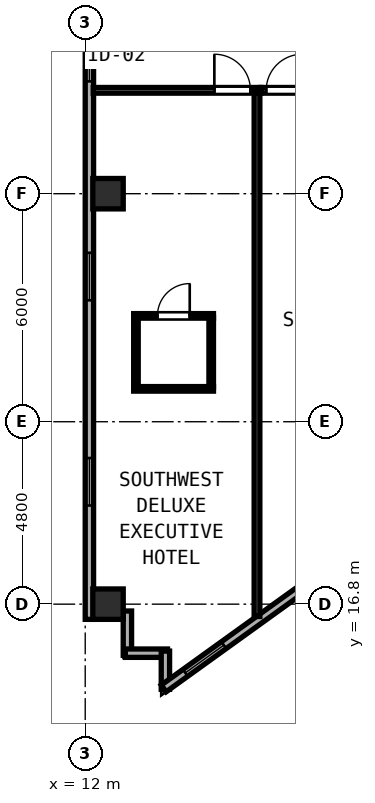
"""IFC4 building model, lengths in metres.
Left out: names, types, materials, properties, quantities, classifications, styles, units other than length and angle.
Written with IfcOpenShell. Run it as: python <this file> out.ifc"""

import sys

from ifc_helpers import new_model, si_unit, direction, frame, frame_2d, origin, origin_2d, place, context, subcontext, project, spatial, rectangle, hollow_rectangle, extrude, element, fill, save


model = new_model("IFC4")
c1 = context("Model", 3, precision=1e-05, world=origin(), true_north=direction((0.0, 1.0)))
c2 = subcontext(c1, "Body", "Model", "MODEL_VIEW")
j1 = project(units=[si_unit("LENGTHUNIT", "METRE"), si_unit("PLANEANGLEUNIT", "RADIAN")], contexts=[c1])
p1 = place(None, origin())
s1 = spatial("IfcSite", under=j1, at=p1, CompositionType="ELEMENT")
p2 = place(p1, origin())
s2 = spatial("IfcBuilding", under=s1, at=p2, CompositionType="ELEMENT")
p3 = place(p2, frame((0.0, 0.0, 262.15)))
s3 = spatial("IfcBuildingStorey", under=s2, at=p3, CompositionType="ELEMENT", Elevation=262.15)
for number, where, z_axis, x_axis in (
    (1, (12.6, 16.8, 0.0), (0.0, 0.0, 1.0), (1.0, 0.0, 0.0)),
    (2, (12.6, 27.6, 0.0), (0.0, 0.0, 1.0), (1.0, 0.0, 0.0)),
):
    element("IfcColumn", number, at=place(p3, frame(where, z_axis=z_axis, x_axis=x_axis)), inside=s3, PredefinedType="COLUMN", context=c2, shape_type="SweptSolid", body=[
        extrude(hollow_rectangle(XDim=0.8, YDim=0.8, WallThickness=0.03, at=origin_2d()), origin(), (0.0, 0.0, 1.0), 3.85),
    ])
p4 = place(p3, frame((12.11, 37.545, 0.0), z_axis=(0.0, 0.0, 1.0), x_axis=(0.0, -1.0, 0.0)))
e3 = element("IfcWall", 3, at=p4, inside=s3, PredefinedType="SOLIDWALL", context=c2, shape_type="SweptSolid", body=[
    extrude(rectangle(XDim=21.145, YDim=0.22, at=frame_2d((10.573, 0.0))), origin(), (0.0, 0.0, 1.0), 3.67),
])
p5 = place(p4, frame((0.7, 0.0, 0.85)))
e4 = element("IfcOpeningElement", 4, at=p5, cuts=e3, PredefinedType="OPENING", context=c2, shape_type="SweptSolid", body=[
    extrude(rectangle(XDim=1.25, YDim=1.95, at=frame_2d((0.625, 0.975))), frame((0.0, 0.12, 0.0), z_axis=(0.0, -1.0, 0.0), x_axis=(1.0, 0.0, 0.0)), (0.0, 0.0, 1.0), 0.24),
])
p6 = place(p4, frame((5.74, 0.0, 0.85)))
e5 = element("IfcOpeningElement", 5, at=p6, cuts=e3, PredefinedType="OPENING", context=c2, shape_type="SweptSolid", body=[
    extrude(rectangle(XDim=1.25, YDim=1.95, at=frame_2d((0.625, 0.975))), frame((0.0, 0.12, 0.0), z_axis=(0.0, -1.0, 0.0), x_axis=(1.0, 0.0, 0.0)), (0.0, 0.0, 1.0), 0.24),
])
p7 = place(p4, frame((11.5, 0.0, 0.85)))
e6 = element("IfcOpeningElement", 6, at=p7, cuts=e3, PredefinedType="OPENING", context=c2, shape_type="SweptSolid", body=[
    extrude(rectangle(XDim=1.25, YDim=1.95, at=frame_2d((0.625, 0.975))), frame((0.0, 0.12, 0.0), z_axis=(0.0, -1.0, 0.0), x_axis=(1.0, 0.0, 0.0)), (0.0, 0.0, 1.0), 0.24),
])
p8 = place(p4, frame((16.9, 0.0, 0.85)))
e7 = element("IfcOpeningElement", 7, at=p8, cuts=e3, PredefinedType="OPENING", context=c2, shape_type="SweptSolid", body=[
    extrude(rectangle(XDim=1.25, YDim=1.95, at=frame_2d((0.625, 0.975))), frame((0.0, 0.12, 0.0), z_axis=(0.0, -1.0, 0.0), x_axis=(1.0, 0.0, 0.0)), (0.0, 0.0, 1.0), 0.24),
])
p9 = place(p3, frame((13.11, 16.62, 0.0), z_axis=(0.0, 0.0, 1.0), x_axis=(0.0, -1.0, 0.0)))
e8 = element("IfcWall", 8, at=p9, inside=s3, PredefinedType="SOLIDWALL", context=c2, shape_type="SweptSolid", body=[
    extrude(rectangle(XDim=1.165, YDim=0.22, at=frame_2d((0.583, 0.0))), origin(), (0.0, 0.0, 1.0), 3.67),
])
p10 = place(p3, frame((13.055, 15.51, 0.0), z_axis=(0.0, 0.0, 1.0), x_axis=(1.0, 0.0, 0.0)))
e9 = element("IfcWall", 9, at=p10, inside=s3, PredefinedType="SOLIDWALL", context=c2, shape_type="SweptSolid", body=[
    extrude(rectangle(XDim=1.11, YDim=0.22, at=frame_2d((0.555, 0.0))), origin(), (0.0, 0.0, 1.0), 3.67),
])
p11 = place(p3, frame((14.11, 15.565, 0.0), z_axis=(0.0, 0.0, 1.0), x_axis=(0.0, -1.0, 0.0)))
e10 = element("IfcWall", 10, at=p11, inside=s3, PredefinedType="SOLIDWALL", context=c2, shape_type="SweptSolid", body=[
    extrude(rectangle(XDim=1.005, YDim=0.22, at=frame_2d((0.502, 0.0))), origin(), (0.0, 0.0, 1.0), 3.67),
])
p12 = place(p3, frame((14.065, 14.583, 0.0), z_axis=(0.0, 0.0, 1.0), x_axis=(0.811523708458, 0.584319493608, 0.0)))
e11 = element("IfcWall", 11, at=p12, inside=s3, PredefinedType="SOLIDWALL", context=c2, shape_type="SweptSolid", body=[
    extrude(rectangle(XDim=11.759, YDim=0.22, at=frame_2d((5.879, 0.0))), origin(), (0.0, 0.0, 1.0), 3.315),
])
p13 = place(p12, frame((0.7, 0.0, 0.85)))
e12 = element("IfcOpeningElement", 12, at=p13, cuts=e11, PredefinedType="OPENING", context=c2, shape_type="SweptSolid", body=[
    extrude(rectangle(XDim=1.25, YDim=1.95, at=frame_2d((0.625, 0.975))), frame((0.0, 0.12, 0.0), z_axis=(0.0, -1.0, 0.0), x_axis=(1.0, 0.0, 0.0)), (0.0, 0.0, 1.0), 0.24),
])
p14 = place(p12, frame((6.1, 0.0, 0.85)))
e13 = element("IfcOpeningElement", 13, at=p14, cuts=e11, PredefinedType="OPENING", context=c2, shape_type="SweptSolid", body=[
    extrude(rectangle(XDim=1.25, YDim=1.95, at=frame_2d((0.625, 0.975))), frame((0.0, 0.12, 0.0), z_axis=(0.0, -1.0, 0.0), x_axis=(1.0, 0.0, 0.0)), (0.0, 0.0, 1.0), 0.24),
])
p15 = place(p12, frame((9.336, 0.0, 0.85)))
e14 = element("IfcOpeningElement", 14, at=p15, cuts=e11, PredefinedType="OPENING", context=c2, shape_type="SweptSolid", body=[
    extrude(rectangle(XDim=1.25, YDim=1.95, at=frame_2d((0.625, 0.975))), frame((0.0, 0.12, 0.0), z_axis=(0.0, -1.0, 0.0), x_axis=(1.0, 0.0, 0.0)), (0.0, 0.0, 1.0), 0.24),
])
p16 = place(p3, frame((12.212, 30.32, 0.0), z_axis=(0.0, 0.0, 1.0), x_axis=(1.0, 0.0, 0.0)))
e15 = element("IfcWall", 15, at=p16, inside=s3, PredefinedType="PARTITIONING", context=c2, shape_type="SweptSolid", body=[
    extrude(rectangle(XDim=4.408, YDim=0.15, at=frame_2d((2.204, 0.0))), origin(), (0.0, 0.0, 1.0), 3.67),
])
p17 = place(p16, frame((4.136, 0.0, 0.0), z_axis=(0.0, 0.0, 1.0), x_axis=(-1.0, 0.0, 0.0)))
e16 = element("IfcOpeningElement", 16, at=p17, cuts=e15, PredefinedType="OPENING", context=c2, shape_type="SweptSolid", body=[
    extrude(rectangle(XDim=0.95, YDim=2.18, at=frame_2d((0.475, 1.09))), frame((0.0, 0.085, 0.0), z_axis=(0.0, -1.0, 0.0), x_axis=(1.0, 0.0, 0.0)), (0.0, 0.0, 1.0), 0.17),
])
p18 = place(p3, frame((16.52, 16.476, 0.0), z_axis=(0.0, 0.0, 1.0), x_axis=(0.0, 1.0, 0.0)))
e17 = element("IfcWall", 17, at=p18, inside=s3, PredefinedType="PARTITIONING", context=c2, shape_type="SweptSolid", body=[
    extrude(rectangle(XDim=13.784, YDim=0.15, at=frame_2d((6.892, 0.0))), origin(), (0.0, 0.0, 1.0), 3.67),
])
p19 = place(p3, frame((13.275, 24.385, 0.0), z_axis=(0.0, 0.0, 1.0), x_axis=(1.0, 0.0, 0.0)))
e18 = element("IfcWall", 18, at=p19, inside=s3, PredefinedType="PARTITIONING", context=c2, shape_type="SweptSolid", body=[
    extrude(rectangle(XDim=2.1, YDim=0.12, at=frame_2d((1.05, 0.0))), origin(), (0.0, 0.0, 1.0), 3.67),
])
p20 = place(p19, frame((1.475, 0.0, 0.0), z_axis=(0.0, 0.0, 1.0), x_axis=(-1.0, 0.0, 0.0)))
e19 = element("IfcOpeningElement", 19, at=p20, cuts=e18, PredefinedType="OPENING", context=c2, shape_type="SweptSolid", body=[
    extrude(rectangle(XDim=0.85, YDim=2.1, at=frame_2d((0.425, 1.05))), frame((0.0, 0.07, 0.0), z_axis=(0.0, -1.0, 0.0), x_axis=(1.0, 0.0, 0.0)), (0.0, 0.0, 1.0), 0.14),
])
p21 = place(p3, frame((13.275, 22.465, 0.0), z_axis=(0.0, 0.0, 1.0), x_axis=(1.0, 0.0, 0.0)))
e20 = element("IfcWall", 20, at=p21, inside=s3, PredefinedType="PARTITIONING", context=c2, shape_type="SweptSolid", body=[
    extrude(rectangle(XDim=2.1, YDim=0.12, at=frame_2d((1.05, 0.0))), origin(), (0.0, 0.0, 1.0), 3.67),
])
for number, where, z_axis, x_axis in (
    (21, (13.335, 22.51, 0.0), (0.0, 0.0, 1.0), (0.0, 1.0, 0.0)),
    (22, (15.315, 22.51, 0.0), (0.0, 0.0, 1.0), (0.0, 1.0, 0.0)),
):
    element("IfcWall", number, at=place(p3, frame(where, z_axis=z_axis, x_axis=x_axis)), inside=s3, PredefinedType="PARTITIONING", context=c2, shape_type="SweptSolid", body=[
        extrude(rectangle(XDim=1.83, YDim=0.12, at=frame_2d((0.915, 0.0))), origin(), (0.0, 0.0, 1.0), 3.67),
    ])
p22 = place(p3, frame((16.622, 30.32, 0.0), z_axis=(0.0, 0.0, 1.0), x_axis=(1.0, 0.0, 0.0)))
e23 = element("IfcWall", 23, at=p22, inside=s3, PredefinedType="PARTITIONING", context=c2, shape_type="SweptSolid", body=[
    extrude(rectangle(XDim=4.098, YDim=0.15, at=frame_2d((2.049, 0.0))), origin(), (0.0, 0.0, 1.0), 3.67),
])
p23 = place(p22, frame((1.09, 0.0, 0.0), z_axis=(0.0, 0.0, 1.0), x_axis=(-1.0, 0.0, 0.0)))
e24 = element("IfcOpeningElement", 24, at=p23, cuts=e23, PredefinedType="OPENING", context=c2, shape_type="SweptSolid", body=[
    extrude(rectangle(XDim=0.95, YDim=2.15, at=frame_2d((0.475, 1.075))), frame((0.0, 0.085, 0.0), z_axis=(0.0, -1.0, 0.0), x_axis=(1.0, 0.0, 0.0)), (0.0, 0.0, 1.0), 0.17),
])
p24 = place(p6, origin())
e25 = element("IfcWindow", 25, at=p24, inside=s3, PartitioningType="SINGLE_PANEL", PredefinedType="WINDOW", context=c2, shape_type="SweptSolid", body=[
    extrude(rectangle(XDim=1.25, YDim=1.95, at=frame_2d((0.625, 0.975))), frame((0.0, 0.03, 0.0), z_axis=(0.0, -1.0, 0.0), x_axis=(1.0, 0.0, 0.0)), (0.0, 0.0, 1.0), 0.06),
])
fill(e5, e25)
p25 = place(p7, origin())
e26 = element("IfcWindow", 26, at=p25, inside=s3, PartitioningType="SINGLE_PANEL", PredefinedType="WINDOW", context=c2, shape_type="SweptSolid", body=[
    extrude(rectangle(XDim=1.25, YDim=1.95, at=frame_2d((0.625, 0.975))), frame((0.0, 0.03, 0.0), z_axis=(0.0, -1.0, 0.0), x_axis=(1.0, 0.0, 0.0)), (0.0, 0.0, 1.0), 0.06),
])
fill(e6, e26)
p26 = place(p8, origin())
e27 = element("IfcWindow", 27, at=p26, inside=s3, PartitioningType="SINGLE_PANEL", PredefinedType="WINDOW", context=c2, shape_type="SweptSolid", body=[
    extrude(rectangle(XDim=1.25, YDim=1.95, at=frame_2d((0.625, 0.975))), frame((0.0, 0.03, 0.0), z_axis=(0.0, -1.0, 0.0), x_axis=(1.0, 0.0, 0.0)), (0.0, 0.0, 1.0), 0.06),
])
fill(e7, e27)
p27 = place(p13, origin())
e28 = element("IfcWindow", 28, at=p27, inside=s3, PartitioningType="SINGLE_PANEL", PredefinedType="WINDOW", context=c2, shape_type="SweptSolid", body=[
    extrude(rectangle(XDim=1.25, YDim=1.95, at=frame_2d((0.625, 0.975))), frame((0.0, 0.03, 0.0), z_axis=(0.0, -1.0, 0.0), x_axis=(1.0, 0.0, 0.0)), (0.0, 0.0, 1.0), 0.06),
])
fill(e12, e28)
p28 = place(p17, origin())
e29 = element("IfcDoor", 29, at=p28, inside=s3, OperationType="SINGLE_SWING_RIGHT", PredefinedType="DOOR", context=c2, shape_type="SweptSolid", body=[
    extrude(rectangle(XDim=0.95, YDim=2.18, at=frame_2d((0.475, 1.09))), frame((0.0, 0.025, 0.0), z_axis=(0.0, -1.0, 0.0), x_axis=(1.0, 0.0, 0.0)), (0.0, 0.0, 1.0), 0.05),
])
fill(e16, e29)
p29 = place(p20, origin())
e30 = element("IfcDoor", 30, at=p29, inside=s3, OperationType="SINGLE_SWING_LEFT", PredefinedType="DOOR", context=c2, shape_type="SweptSolid", body=[
    extrude(rectangle(XDim=0.85, YDim=2.1, at=frame_2d((0.425, 1.05))), frame((0.0, 0.025, 0.0), z_axis=(0.0, -1.0, 0.0), x_axis=(1.0, 0.0, 0.0)), (0.0, 0.0, 1.0), 0.05),
])
fill(e19, e30)
p30 = place(p23, origin())
e31 = element("IfcDoor", 31, at=p30, inside=s3, OperationType="SINGLE_SWING_LEFT", PredefinedType="DOOR", context=c2, shape_type="SweptSolid", body=[
    extrude(rectangle(XDim=0.95, YDim=2.15, at=frame_2d((0.475, 1.075))), frame((0.0, 0.025, 0.0), z_axis=(0.0, -1.0, 0.0), x_axis=(1.0, 0.0, 0.0)), (0.0, 0.0, 1.0), 0.05),
])
fill(e24, e31)
save(model, sys.argv[1])
